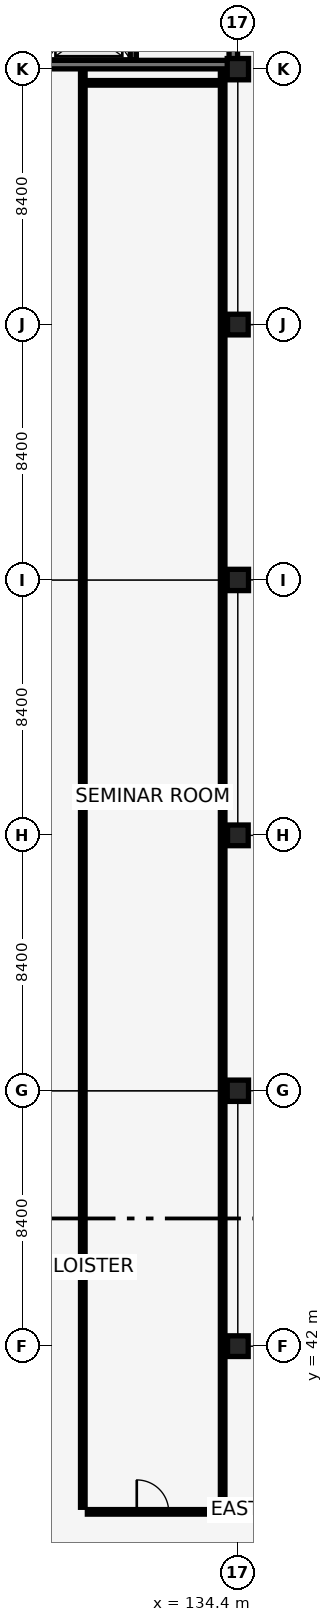
"""IFC4 building model, lengths in metres.
Left out: names, types, materials, properties, quantities, classifications, styles, units other than length and angle.
Written with IfcOpenShell. Run it as: python <this file> out.ifc"""

import sys

from ifc_helpers import new_model, si_unit, direction, frame, frame_2d, origin, origin_2d, place, context, subcontext, project, spatial, rectangle, extrude, element, fill, save


model = new_model("IFC4")
c1 = context("Model", 3, precision=1e-05, world=origin(), true_north=direction((0.0, 1.0)))
c2 = subcontext(c1, "Body", "Model", "MODEL_VIEW")
j1 = project(units=[si_unit("LENGTHUNIT", "METRE"), si_unit("PLANEANGLEUNIT", "RADIAN")], contexts=[c1])
p1 = place(None, origin())
s1 = spatial("IfcSite", under=j1, at=p1, CompositionType="ELEMENT")
p2 = place(p1, origin())
s2 = spatial("IfcBuilding", under=s1, at=p2, CompositionType="ELEMENT")
p3 = place(p2, frame((0.0, 0.0, 9.86)))
s3 = spatial("IfcBuildingStorey", under=s2, at=p3, CompositionType="ELEMENT", Elevation=9.86)
p4 = place(p3, frame((126.15, 84.15, 0.0), z_axis=(0.0, 0.0, 1.0), x_axis=(1.0, 0.0, 0.0)))
e1 = element("IfcWall", 1, at=p4, inside=s3, PredefinedType="SHEAR", context=c2, shape_type="SweptSolid", body=[
    extrude(rectangle(XDim=8.1, YDim=0.28, at=frame_2d((4.05, 0.0))), origin(), (0.0, 0.0, 1.0), 3.78),
])
p5 = place(p4, frame((0.485, 0.0, 0.0)))
e2 = element("IfcOpeningElement", 2, at=p5, cuts=e1, PredefinedType="OPENING", context=c2, shape_type="SweptSolid", body=[
    extrude(rectangle(XDim=1.0, YDim=2.15, at=frame_2d((0.5, 1.075))), frame((0.0, 0.15, 0.0), z_axis=(0.0, -1.0, 0.0), x_axis=(1.0, 0.0, 0.0)), (0.0, 0.0, 1.0), 0.3),
])
p6 = place(p3, frame((134.25, 84.15, 0.0), z_axis=(0.0, 0.0, 1.0), x_axis=(0.0, 1.0, 0.0)))
e3 = element("IfcWall", 3, at=p6, inside=s3, PredefinedType="SHEAR", context=c2, shape_type="SweptSolid", body=[
    extrude(rectangle(XDim=8.1, YDim=0.28, at=frame_2d((4.05, 0.0))), origin(), (0.0, 0.0, 1.0), 3.78),
])
p7 = place(p6, frame((1.325, 0.0, 0.0)))
e4 = element("IfcOpeningElement", 4, at=p7, cuts=e3, PredefinedType="OPENING", context=c2, shape_type="SweptSolid", body=[
    extrude(rectangle(XDim=1.45, YDim=2.15, at=frame_2d((0.725, 1.075))), frame((0.0, 0.15, 0.0), z_axis=(0.0, -1.0, 0.0), x_axis=(1.0, 0.0, 0.0)), (0.0, 0.0, 1.0), 0.3),
])
p8 = place(p3, frame((134.4, 42.0, 0.0), z_axis=(0.0, 0.0, 1.0), x_axis=(1.0, 0.0, 0.0)))
e5 = element("IfcColumn", 5, at=p8, inside=s3, PredefinedType="COLUMN", context=c2, shape_type="SweptSolid", body=[
    extrude(rectangle(XDim=0.68, YDim=0.68, at=origin_2d()), origin(), (0.0, 0.0, 1.0), 3.78),
])
p9 = place(p3, frame((134.4, 50.4, 0.0), z_axis=(0.0, 0.0, 1.0), x_axis=(1.0, 0.0, 0.0)))
e6 = element("IfcColumn", 6, at=p9, inside=s3, PredefinedType="COLUMN", context=c2, shape_type="SweptSolid", body=[
    extrude(rectangle(XDim=0.7, YDim=0.7, at=origin_2d()), origin(), (0.0, 0.0, 1.0), 3.78),
])
p10 = place(p3, frame((134.4, 58.8, 0.0), z_axis=(0.0, 0.0, 1.0), x_axis=(1.0, 0.0, 0.0)))
e7 = element("IfcColumn", 7, at=p10, inside=s3, PredefinedType="COLUMN", context=c2, shape_type="SweptSolid", body=[
    extrude(rectangle(XDim=0.68, YDim=0.68, at=origin_2d()), origin(), (0.0, 0.0, 1.0), 3.78),
])
p11 = place(p3, frame((134.4, 67.2, 0.0), z_axis=(0.0, 0.0, 1.0), x_axis=(1.0, 0.0, 0.0)))
e8 = element("IfcColumn", 8, at=p11, inside=s3, PredefinedType="COLUMN", context=c2, shape_type="SweptSolid", body=[
    extrude(rectangle(XDim=0.7, YDim=0.7, at=origin_2d()), origin(), (0.0, 0.0, 1.0), 3.78),
])
p12 = place(p3, frame((134.4, 75.6, 0.0), z_axis=(0.0, 0.0, 1.0), x_axis=(1.0, 0.0, 0.0)))
e9 = element("IfcColumn", 9, at=p12, inside=s3, PredefinedType="COLUMN", context=c2, shape_type="SweptSolid", body=[
    extrude(rectangle(XDim=0.68, YDim=0.68, at=origin_2d()), origin(), (0.0, 0.0, 1.0), 3.78),
])
p13 = place(p3, frame((134.4, 84.0, 0.0), z_axis=(0.0, 0.0, 1.0), x_axis=(1.0, 0.0, 0.0)))
e10 = element("IfcColumn", 10, at=p13, inside=s3, PredefinedType="COLUMN", context=c2, shape_type="SweptSolid", body=[
    extrude(rectangle(XDim=0.7, YDim=0.7, at=origin_2d()), origin(), (0.0, 0.0, 1.0), 3.78),
])
p14 = place(p3, frame((130.96, 84.3, 0.0), z_axis=(0.0, 0.0, 1.0), x_axis=(0.0, 1.0, 0.0)))
e11 = element("IfcWall", 11, at=p14, inside=s3, PredefinedType="SHEAR", context=c2, shape_type="SweptSolid", body=[
    extrude(rectangle(XDim=3.8, YDim=0.2, at=frame_2d((1.9, 0.0))), origin(), (0.0, 0.0, 1.0), 2.91),
])
p15 = place(p14, frame((0.375, 0.0, 0.0)))
e12 = element("IfcOpeningElement", 12, at=p15, cuts=e11, PredefinedType="OPENING", context=c2, shape_type="SweptSolid", body=[
    extrude(rectangle(XDim=1.1, YDim=2.15, at=frame_2d((0.55, 1.075))), frame((0.0, 0.11, 0.0), z_axis=(0.0, -1.0, 0.0), x_axis=(1.0, 0.0, 0.0)), (0.0, 0.0, 1.0), 0.22),
])
p16 = place(p14, frame((2.175, 0.0, 0.0)))
e13 = element("IfcOpeningElement", 13, at=p16, cuts=e11, PredefinedType="OPENING", context=c2, shape_type="SweptSolid", body=[
    extrude(rectangle(XDim=1.4, YDim=2.2, at=frame_2d((0.7, 1.1))), frame((0.0, 0.11, 0.0), z_axis=(0.0, -1.0, 0.0), x_axis=(1.0, 0.0, 0.0)), (0.0, 0.0, 1.0), 0.22),
])
p17 = place(p3, frame((129.45, 36.55, 0.0), z_axis=(0.0, 0.0, 1.0), x_axis=(1.0, 0.0, 0.0)))
e14 = element("IfcWall", 14, at=p17, inside=s3, PredefinedType="PARTITIONING", context=c2, shape_type="SweptSolid", body=[
    extrude(rectangle(XDim=4.3, YDim=0.15, at=frame_2d((2.15, 0.0))), origin(), (0.0, 0.0, 1.0), 3.78),
])
p18 = place(p17, frame((1.625, 0.0, 0.0)))
e15 = element("IfcOpeningElement", 15, at=p18, cuts=e14, PredefinedType="OPENING", context=c2, shape_type="SweptSolid", body=[
    extrude(rectangle(XDim=1.05, YDim=2.15, at=frame_2d((0.525, 1.075))), frame((0.0, 0.085, 0.0), z_axis=(0.0, -1.0, 0.0), x_axis=(1.0, 0.0, 0.0)), (0.0, 0.0, 1.0), 0.17),
])
p19 = place(p3, frame((129.45, 83.55, 0.0), z_axis=(0.0, 0.0, 1.0), x_axis=(1.0, 0.0, 0.0)))
e16 = element("IfcWall", 16, at=p19, inside=s3, PredefinedType="PARTITIONING", context=c2, shape_type="SweptSolid", body=[
    extrude(rectangle(XDim=4.3, YDim=0.15, at=frame_2d((2.15, 0.0))), origin(), (0.0, 0.0, 1.0), 3.78),
])
for number, where, z_axis, x_axis in (
    (17, (129.3, 36.7, 0.0), (0.0, 0.0, 1.0), (0.0, 1.0, 0.0)),
    (18, (133.9, 36.7, 0.0), (0.0, 0.0, 1.0), (0.0, 1.0, 0.0)),
):
    element("IfcWall", number, at=place(p3, frame(where, z_axis=z_axis, x_axis=x_axis)), inside=s3, PredefinedType="PARTITIONING", context=c2, shape_type="SweptSolid", body=[
        extrude(rectangle(XDim=47.27, YDim=0.15, at=frame_2d((23.635, 0.0))), origin(), (0.0, 0.0, 1.0), 2.91),
    ])
p20 = place(p18, origin())
e19 = element("IfcDoor", 19, at=p20, inside=s3, OperationType="SINGLE_SWING_LEFT", PredefinedType="DOOR", context=c2, shape_type="SweptSolid", body=[
    extrude(rectangle(XDim=1.05, YDim=2.15, at=frame_2d((0.525, 1.075))), frame((0.0, 0.025, 0.0), z_axis=(0.0, -1.0, 0.0), x_axis=(1.0, 0.0, 0.0)), (0.0, 0.0, 1.0), 0.05),
])
fill(e15, e19)
save(model, sys.argv[1])
